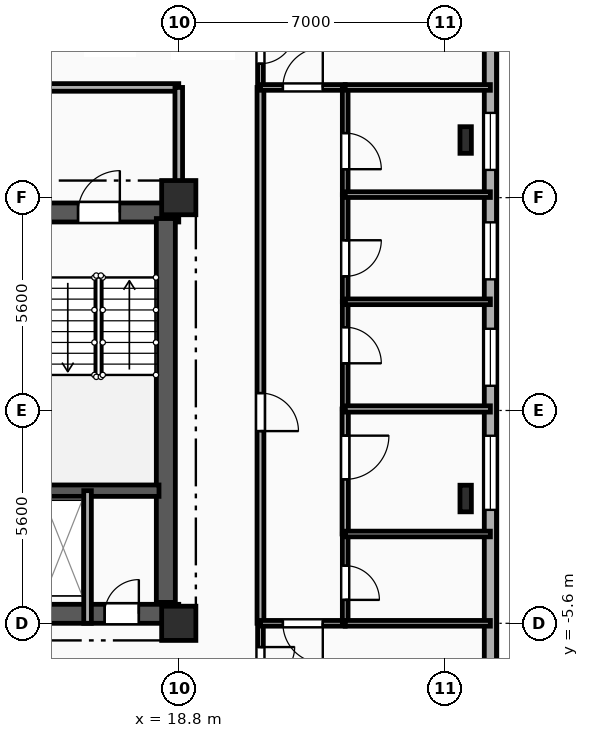
"""IFC4 building model, lengths in metres.
Left out: names, types, materials, properties, quantities, classifications, styles, units other than length and angle.
Written with IfcOpenShell. Run it as: python <this file> out.ifc"""

import sys

from ifc_helpers import new_model, si_unit, direction, frame, frame_2d, origin, origin_2d, place, context, subcontext, project, spatial, rectangle, i_section, extrude, element, fill, save


model = new_model("IFC4")
c1 = context("Model", 3, precision=1e-05, world=origin(), true_north=direction((0.0, 1.0)))
c2 = subcontext(c1, "Body", "Model", "MODEL_VIEW")
j1 = project(units=[si_unit("LENGTHUNIT", "METRE"), si_unit("PLANEANGLEUNIT", "RADIAN")], contexts=[c1])
p1 = place(None, origin())
s1 = spatial("IfcSite", under=j1, at=p1, CompositionType="ELEMENT")
p2 = place(p1, origin())
s2 = spatial("IfcBuilding", under=s1, at=p2, CompositionType="ELEMENT")
p3 = place(p2, frame((0.0, 0.0, 137.7)))
s3 = spatial("IfcBuildingStorey", under=s2, at=p3, CompositionType="ELEMENT", Elevation=137.7)
for number, where, z_axis, x_axis in (
    (1, (18.8, -5.6, 0.0), (0.0, 0.0, 1.0), (1.0, 0.0, 0.0)),
    (2, (18.8, 5.6, 0.0), (0.0, 0.0, 1.0), (1.0, 0.0, 0.0)),
):
    element("IfcColumn", number, at=place(p3, frame(where, z_axis=z_axis, x_axis=x_axis)), inside=s3, PredefinedType="COLUMN", context=c2, shape_type="SweptSolid", body=[
        extrude(rectangle(XDim=0.9, YDim=0.9, at=origin_2d()), origin(), (0.0, 0.0, 1.0), 3.35),
    ])
for number, where, z_axis, x_axis in (
    (3, (26.35, -2.317, 0.0), (0.0, 0.0, 1.0), (1.0, 0.0, 0.0)),
    (4, (26.35, 7.117, 0.0), (0.0, 0.0, 1.0), (1.0, 0.0, 0.0)),
):
    element("IfcColumn", number, at=place(p3, frame(where, z_axis=z_axis, x_axis=x_axis)), inside=s3, PredefinedType="COLUMN", context=c2, shape_type="SweptSolid", body=[
        extrude(i_section(OverallWidth=0.3, OverallDepth=0.7, WebThickness=0.017, FlangeThickness=0.032, FilletRadius=0.027, at=origin_2d()), origin(), (0.0, 0.0, 1.0), 3.35),
    ])
p4 = place(p3, frame((27.0, 17.2, 0.0), z_axis=(0.0, 0.0, 1.0), x_axis=(0.0, -1.0, 0.0)))
e5 = element("IfcWall", 5, at=p4, inside=s3, PredefinedType="SOLIDWALL", context=c2, shape_type="SweptSolid", body=[
    extrude(rectangle(XDim=29.6, YDim=0.32, at=frame_2d((14.8, 0.0))), origin(), (0.0, 0.0, 1.0), 3.04),
])
p5 = place(p4, frame((3.775, 0.0, 0.85)))
e6 = element("IfcOpeningElement", 6, at=p5, cuts=e5, PredefinedType="OPENING", context=c2, shape_type="SweptSolid", body=[
    extrude(rectangle(XDim=1.65, YDim=1.85, at=frame_2d((0.825, 0.925))), frame((0.0, 0.17, 0.0), z_axis=(0.0, -1.0, 0.0), x_axis=(1.0, 0.0, 0.0)), (0.0, 0.0, 1.0), 0.34),
])
p6 = place(p4, frame((9.37, 0.0, 0.85)))
e7 = element("IfcOpeningElement", 7, at=p6, cuts=e5, PredefinedType="OPENING", context=c2, shape_type="SweptSolid", body=[
    extrude(rectangle(XDim=1.5, YDim=1.85, at=frame_2d((0.75, 0.925))), frame((0.0, 0.17, 0.0), z_axis=(0.0, -1.0, 0.0), x_axis=(1.0, 0.0, 0.0)), (0.0, 0.0, 1.0), 0.34),
])
p7 = place(p4, frame((12.25, 0.0, 0.85)))
e8 = element("IfcOpeningElement", 8, at=p7, cuts=e5, PredefinedType="OPENING", context=c2, shape_type="SweptSolid", body=[
    extrude(rectangle(XDim=1.5, YDim=1.85, at=frame_2d((0.75, 0.925))), frame((0.0, 0.17, 0.0), z_axis=(0.0, -1.0, 0.0), x_axis=(1.0, 0.0, 0.0)), (0.0, 0.0, 1.0), 0.34),
])
p8 = place(p4, frame((15.05, 0.0, 0.85)))
e9 = element("IfcOpeningElement", 9, at=p8, cuts=e5, PredefinedType="OPENING", context=c2, shape_type="SweptSolid", body=[
    extrude(rectangle(XDim=1.5, YDim=1.85, at=frame_2d((0.75, 0.925))), frame((0.0, 0.17, 0.0), z_axis=(0.0, -1.0, 0.0), x_axis=(1.0, 0.0, 0.0)), (0.0, 0.0, 1.0), 0.34),
])
p9 = place(p4, frame((17.865, 0.0, 0.85)))
e10 = element("IfcOpeningElement", 10, at=p9, cuts=e5, PredefinedType="OPENING", context=c2, shape_type="SweptSolid", body=[
    extrude(rectangle(XDim=1.95, YDim=1.85, at=frame_2d((0.975, 0.925))), frame((0.0, 0.17, 0.0), z_axis=(0.0, -1.0, 0.0), x_axis=(1.0, 0.0, 0.0)), (0.0, 0.0, 1.0), 0.34),
])
p10 = place(p4, frame((25.175, 0.0, 0.85)))
e11 = element("IfcOpeningElement", 11, at=p10, cuts=e5, PredefinedType="OPENING", context=c2, shape_type="SweptSolid", body=[
    extrude(rectangle(XDim=1.65, YDim=1.85, at=frame_2d((0.825, 0.925))), frame((0.0, 0.17, 0.0), z_axis=(0.0, -1.0, 0.0), x_axis=(1.0, 0.0, 0.0)), (0.0, 0.0, 1.0), 0.34),
])
p11 = place(p3, frame((9.2, 5.21, 0.0), z_axis=(0.0, 0.0, 1.0), x_axis=(1.0, 0.0, 0.0)))
e12 = element("IfcWall", 12, at=p11, inside=s3, PredefinedType="SHEAR", context=c2, shape_type="SweptSolid", body=[
    extrude(rectangle(XDim=9.6, YDim=0.5, at=frame_2d((4.8, 0.0))), origin(), (0.0, 0.0, 1.0), 3.04),
])
p12 = place(p11, frame((6.95, 0.0, 0.0)))
e13 = element("IfcOpeningElement", 13, at=p12, cuts=e12, PredefinedType="OPENING", context=c2, shape_type="SweptSolid", body=[
    extrude(rectangle(XDim=1.1, YDim=2.15, at=frame_2d((0.55, 1.075))), frame((0.0, 0.26, 0.0), z_axis=(0.0, -1.0, 0.0), x_axis=(1.0, 0.0, 0.0)), (0.0, 0.0, 1.0), 0.52),
])
p13 = place(p11, frame((3.775, 0.0, 0.0)))
e14 = element("IfcOpeningElement", 14, at=p13, cuts=e12, PredefinedType="OPENING", context=c2, shape_type="SweptSolid", body=[
    extrude(rectangle(XDim=1.05, YDim=2.1, at=frame_2d((0.525, 1.05))), frame((0.0, 0.26, 0.0), z_axis=(0.0, -1.0, 0.0), x_axis=(1.0, 0.0, 0.0)), (0.0, 0.0, 1.0), 0.52),
])
p14 = place(p3, frame((9.2, -5.35, 0.0), z_axis=(0.0, 0.0, 1.0), x_axis=(1.0, 0.0, 0.0)))
e15 = element("IfcWall", 15, at=p14, inside=s3, PredefinedType="SHEAR", context=c2, shape_type="SweptSolid", body=[
    extrude(rectangle(XDim=9.6, YDim=0.5, at=frame_2d((4.8, 0.0))), origin(), (0.0, 0.0, 1.0), 3.04),
])
p15 = place(p14, frame((7.65, 0.0, 0.0)))
e16 = element("IfcOpeningElement", 16, at=p15, cuts=e15, PredefinedType="OPENING", context=c2, shape_type="SweptSolid", body=[
    extrude(rectangle(XDim=0.9, YDim=2.1, at=frame_2d((0.45, 1.05))), frame((0.0, 0.26, 0.0), z_axis=(0.0, -1.0, 0.0), x_axis=(1.0, 0.0, 0.0)), (0.0, 0.0, 1.0), 0.52),
])
p16 = place(p3, frame((18.46, -5.05, 0.0), z_axis=(0.0, 0.0, 1.0), x_axis=(0.0, 1.0, 0.0)))
e17 = element("IfcWall", 17, at=p16, inside=s3, PredefinedType="SHEAR", context=c2, shape_type="SweptSolid", body=[
    extrude(rectangle(XDim=10.1, YDim=0.5, at=frame_2d((5.05, 0.0))), origin(), (0.0, 0.0, 1.0), 3.04),
])
p17 = place(p3, frame((15.1, -2.11, 0.0), z_axis=(0.0, 0.0, 1.0), x_axis=(1.0, 0.0, 0.0)))
e18 = element("IfcWall", 18, at=p17, inside=s3, PredefinedType="SHEAR", context=c2, shape_type="SweptSolid", body=[
    extrude(rectangle(XDim=3.18, YDim=0.3, at=frame_2d((1.59, 0.0))), origin(), (0.0, 0.0, 1.0), 3.04),
])
p18 = place(p3, frame((16.4, -2.11, 0.0), z_axis=(0.0, 0.0, 1.0), x_axis=(0.0, -1.0, 0.0)))
e19 = element("IfcWall", 19, at=p18, inside=s3, PredefinedType="PARTITIONING", context=c2, shape_type="SweptSolid", body=[
    extrude(rectangle(XDim=3.49, YDim=0.2, at=frame_2d((1.745, 0.0))), origin(), (0.0, 0.0, 1.0), 3.04),
])
p19 = place(p3, frame((18.8, 8.5, 0.0), z_axis=(0.0, 0.0, 1.0), x_axis=(-1.0, 0.0, 0.0)))
e20 = element("IfcWall", 20, at=p19, inside=s3, PredefinedType="PARTITIONING", context=c2, shape_type="SweptSolid", body=[
    extrude(rectangle(XDim=6.8, YDim=0.2, at=frame_2d((3.4, 0.0))), origin(), (0.0, 0.0, 1.0), 3.04),
])
p20 = place(p19, frame((3.985, 0.0, 0.0)))
e21 = element("IfcOpeningElement", 21, at=p20, cuts=e20, PredefinedType="OPENING", context=c2, shape_type="SweptSolid", body=[
    extrude(rectangle(XDim=1.1, YDim=2.15, at=frame_2d((0.55, 1.075))), frame((0.0, 0.11, 0.0), z_axis=(0.0, -1.0, 0.0), x_axis=(1.0, 0.0, 0.0)), (0.0, 0.0, 1.0), 0.22),
])
p21 = place(p3, frame((18.8, 5.6, 0.0), z_axis=(0.0, 0.0, 1.0), x_axis=(0.0, 1.0, 0.0)))
e22 = element("IfcWall", 22, at=p21, inside=s3, PredefinedType="PARTITIONING", context=c2, shape_type="SweptSolid", body=[
    extrude(rectangle(XDim=2.9, YDim=0.2, at=frame_2d((1.45, 0.0))), origin(), (0.0, 0.0, 1.0), 2.525),
])
p22 = place(p3, frame((20.95, 10.65, 0.0), z_axis=(0.0, 0.0, 1.0), x_axis=(0.0, -1.0, 0.0)))
e23 = element("IfcWall", 23, at=p22, inside=s3, PredefinedType="PARTITIONING", context=c2, shape_type="SweptSolid", body=[
    extrude(rectangle(XDim=2.15, YDim=0.15, at=frame_2d((1.075, 0.0))), origin(), (0.0, 0.0, 1.0), 3.04),
])
p23 = place(p22, frame((0.625, 0.0, 0.0)))
e24 = element("IfcOpeningElement", 24, at=p23, cuts=e23, PredefinedType="OPENING", context=c2, shape_type="SweptSolid", body=[
    extrude(rectangle(XDim=0.9, YDim=2.1, at=frame_2d((0.45, 1.05))), frame((0.0, 0.085, 0.0), z_axis=(0.0, -1.0, 0.0), x_axis=(1.0, 0.0, 0.0)), (0.0, 0.0, 1.0), 0.17),
])
p24 = place(p3, frame((20.95, -5.6, 0.0), z_axis=(0.0, 0.0, 1.0), x_axis=(0.0, -1.0, 0.0)))
e25 = element("IfcWall", 25, at=p24, inside=s3, PredefinedType="PARTITIONING", context=c2, shape_type="SweptSolid", body=[
    extrude(rectangle(XDim=2.15, YDim=0.15, at=frame_2d((1.075, 0.0))), origin(), (0.0, 0.0, 1.0), 3.04),
])
p25 = place(p24, frame((0.625, 0.0, 0.0)))
e26 = element("IfcOpeningElement", 26, at=p25, cuts=e25, PredefinedType="OPENING", context=c2, shape_type="SweptSolid", body=[
    extrude(rectangle(XDim=0.9, YDim=2.1, at=frame_2d((0.45, 1.05))), frame((0.0, 0.085, 0.0), z_axis=(0.0, -1.0, 0.0), x_axis=(1.0, 0.0, 0.0)), (0.0, 0.0, 1.0), 0.17),
])
p26 = place(p3, frame((20.95, 8.5, 0.0), z_axis=(0.0, 0.0, 1.0), x_axis=(0.0, -1.0, 0.0)))
e27 = element("IfcWall", 27, at=p26, inside=s3, PredefinedType="PARTITIONING", context=c2, shape_type="SweptSolid", body=[
    extrude(rectangle(XDim=14.1, YDim=0.18, at=frame_2d((7.05, 0.0))), origin(), (0.0, 0.0, 1.0), 3.04),
])
p27 = place(p26, frame((8.042, 0.0, 0.0)))
e28 = element("IfcOpeningElement", 28, at=p27, cuts=e27, PredefinedType="OPENING", context=c2, shape_type="SweptSolid", body=[
    extrude(rectangle(XDim=1.0, YDim=2.15, at=frame_2d((0.5, 1.075))), frame((0.0, 0.1, 0.0), z_axis=(0.0, -1.0, 0.0), x_axis=(1.0, 0.0, 0.0)), (0.0, 0.0, 1.0), 0.2),
])
p28 = place(p3, frame((20.95, 8.5, 0.0), z_axis=(0.0, 0.0, 1.0), x_axis=(1.0, 0.0, 0.0)))
e29 = element("IfcWall", 29, at=p28, inside=s3, PredefinedType="PARTITIONING", context=c2, shape_type="SweptSolid", body=[
    extrude(rectangle(XDim=2.23, YDim=0.15, at=frame_2d((1.115, 0.0))), origin(), (0.0, 0.0, 1.0), 3.04),
])
p29 = place(p28, frame((0.59, 0.0, 0.0)))
e30 = element("IfcOpeningElement", 30, at=p29, cuts=e29, PredefinedType="OPENING", context=c2, shape_type="SweptSolid", body=[
    extrude(rectangle(XDim=1.05, YDim=2.15, at=frame_2d((0.525, 1.075))), frame((0.0, 0.085, 0.0), z_axis=(0.0, -1.0, 0.0), x_axis=(1.0, 0.0, 0.0)), (0.0, 0.0, 1.0), 0.17),
])
p30 = place(p3, frame((23.18, -5.6, 0.0), z_axis=(0.0, 0.0, 1.0), x_axis=(-1.0, 0.0, 0.0)))
e31 = element("IfcWall", 31, at=p30, inside=s3, PredefinedType="PARTITIONING", context=c2, shape_type="SweptSolid", body=[
    extrude(rectangle(XDim=2.23, YDim=0.15, at=frame_2d((1.115, 0.0))), origin(), (0.0, 0.0, 1.0), 3.04),
])
p31 = place(p30, frame((0.59, 0.0, 0.0)))
e32 = element("IfcOpeningElement", 32, at=p31, cuts=e31, PredefinedType="OPENING", context=c2, shape_type="SweptSolid", body=[
    extrude(rectangle(XDim=1.05, YDim=2.15, at=frame_2d((0.525, 1.075))), frame((0.0, 0.085, 0.0), z_axis=(0.0, -1.0, 0.0), x_axis=(1.0, 0.0, 0.0)), (0.0, 0.0, 1.0), 0.17),
])
p32 = place(p3, frame((23.18, -3.25, 0.0), z_axis=(0.0, 0.0, 1.0), x_axis=(0.0, -1.0, 0.0)))
e33 = element("IfcWall", 33, at=p32, inside=s3, PredefinedType="PLUMBINGWALL", context=c2, shape_type="SweptSolid", body=[
    extrude(rectangle(XDim=2.35, YDim=0.15, at=frame_2d((1.175, 0.0))), origin(), (0.0, 0.0, 1.0), 3.04),
])
p33 = place(p32, frame((0.834, 0.0, 0.0)))
e34 = element("IfcOpeningElement", 34, at=p33, cuts=e33, PredefinedType="OPENING", context=c2, shape_type="SweptSolid", body=[
    extrude(rectangle(XDim=0.9, YDim=2.1, at=frame_2d((0.45, 1.05))), frame((0.0, 0.085, 0.0), z_axis=(0.0, -1.0, 0.0), x_axis=(1.0, 0.0, 0.0)), (0.0, 0.0, 1.0), 0.17),
])
p34 = place(p3, frame((23.18, 0.04, 0.0), z_axis=(0.0, 0.0, 1.0), x_axis=(0.0, -1.0, 0.0)))
e35 = element("IfcWall", 35, at=p34, inside=s3, PredefinedType="PARTITIONING", context=c2, shape_type="SweptSolid", body=[
    extrude(rectangle(XDim=3.29, YDim=0.165, at=frame_2d((1.645, 0.0))), origin(), (0.0, 0.0, 1.0), 3.04),
])
p35 = place(p34, frame((0.702, 0.0, 0.0)))
e36 = element("IfcOpeningElement", 36, at=p35, cuts=e35, PredefinedType="OPENING", context=c2, shape_type="SweptSolid", body=[
    extrude(rectangle(XDim=1.15, YDim=2.15, at=frame_2d((0.575, 1.075))), frame((0.0, 0.093, 0.0), z_axis=(0.0, -1.0, 0.0), x_axis=(1.0, 0.0, 0.0)), (0.0, 0.0, 1.0), 0.185),
])
p36 = place(p3, frame((23.18, 2.86, 0.0), z_axis=(0.0, 0.0, 1.0), x_axis=(0.0, -1.0, 0.0)))
e37 = element("IfcWall", 37, at=p36, inside=s3, PredefinedType="PARTITIONING", context=c2, shape_type="SweptSolid", body=[
    extrude(rectangle(XDim=2.82, YDim=0.15, at=frame_2d((1.41, 0.0))), origin(), (0.0, 0.0, 1.0), 3.04),
])
p37 = place(p36, frame((0.669, 0.0, 0.0)))
e38 = element("IfcOpeningElement", 38, at=p37, cuts=e37, PredefinedType="OPENING", context=c2, shape_type="SweptSolid", body=[
    extrude(rectangle(XDim=0.95, YDim=2.1, at=frame_2d((0.475, 1.05))), frame((0.0, 0.085, 0.0), z_axis=(0.0, -1.0, 0.0), x_axis=(1.0, 0.0, 0.0)), (0.0, 0.0, 1.0), 0.17),
])
p38 = place(p3, frame((23.18, 5.68, 0.0), z_axis=(0.0, 0.0, 1.0), x_axis=(0.0, -1.0, 0.0)))
e39 = element("IfcWall", 39, at=p38, inside=s3, PredefinedType="PARTITIONING", context=c2, shape_type="SweptSolid", body=[
    extrude(rectangle(XDim=2.82, YDim=0.15, at=frame_2d((1.41, 0.0))), origin(), (0.0, 0.0, 1.0), 3.04),
])
p39 = place(p38, frame((1.201, 0.0, 0.0)))
e40 = element("IfcOpeningElement", 40, at=p39, cuts=e39, PredefinedType="OPENING", context=c2, shape_type="SweptSolid", body=[
    extrude(rectangle(XDim=0.95, YDim=2.1, at=frame_2d((0.475, 1.05))), frame((0.0, 0.085, 0.0), z_axis=(0.0, -1.0, 0.0), x_axis=(1.0, 0.0, 0.0)), (0.0, 0.0, 1.0), 0.17),
])
p40 = place(p3, frame((23.18, 8.5, 0.0), z_axis=(0.0, 0.0, 1.0), x_axis=(0.0, -1.0, 0.0)))
e41 = element("IfcWall", 41, at=p40, inside=s3, PredefinedType="PARTITIONING", context=c2, shape_type="SweptSolid", body=[
    extrude(rectangle(XDim=2.82, YDim=0.15, at=frame_2d((1.41, 0.0))), origin(), (0.0, 0.0, 1.0), 3.04),
])
p41 = place(p40, frame((1.201, 0.0, 0.0)))
e42 = element("IfcOpeningElement", 42, at=p41, cuts=e41, PredefinedType="OPENING", context=c2, shape_type="SweptSolid", body=[
    extrude(rectangle(XDim=0.95, YDim=2.1, at=frame_2d((0.475, 1.05))), frame((0.0, 0.085, 0.0), z_axis=(0.0, -1.0, 0.0), x_axis=(1.0, 0.0, 0.0)), (0.0, 0.0, 1.0), 0.17),
])
p42 = place(p3, frame((27.0, 8.5, 0.0), z_axis=(0.0, 0.0, 1.0), x_axis=(-1.0, 0.0, 0.0)))
e43 = element("IfcWall", 43, at=p42, inside=s3, PredefinedType="PARTITIONING", context=c2, shape_type="SweptSolid", body=[
    extrude(rectangle(XDim=3.82, YDim=0.15, at=frame_2d((1.91, 0.0))), origin(), (0.0, 0.0, 1.0), 3.04),
])
for number, where, z_axis, x_axis in (
    (44, (23.18, -5.6, 0.0), (0.0, 0.0, 1.0), (1.0, 0.0, 0.0)),
    (45, (23.18, -3.25, 0.0), (0.0, 0.0, 1.0), (1.0, 0.0, 0.0)),
):
    element("IfcWall", number, at=place(p3, frame(where, z_axis=z_axis, x_axis=x_axis)), inside=s3, PredefinedType="PLUMBINGWALL", context=c2, shape_type="SweptSolid", body=[
        extrude(rectangle(XDim=3.82, YDim=0.15, at=frame_2d((1.91, 0.0))), origin(), (0.0, 0.0, 1.0), 3.04),
    ])
p43 = place(p3, frame((23.18, 0.04, 0.0), z_axis=(0.0, 0.0, 1.0), x_axis=(1.0, 0.0, 0.0)))
e46 = element("IfcWall", 46, at=p43, inside=s3, PredefinedType="PARTITIONING", context=c2, shape_type="SweptSolid", body=[
    extrude(rectangle(XDim=3.82, YDim=0.165, at=frame_2d((1.91, 0.0))), origin(), (0.0, 0.0, 1.0), 3.04),
])
for number, where, z_axis, x_axis in (
    (47, (23.18, 2.86, 0.0), (0.0, 0.0, 1.0), (1.0, 0.0, 0.0)),
    (48, (23.18, 5.68, 0.0), (0.0, 0.0, 1.0), (1.0, 0.0, 0.0)),
):
    element("IfcWall", number, at=place(p3, frame(where, z_axis=z_axis, x_axis=x_axis)), inside=s3, PredefinedType="PARTITIONING", context=c2, shape_type="SweptSolid", body=[
        extrude(rectangle(XDim=3.82, YDim=0.15, at=frame_2d((1.91, 0.0))), origin(), (0.0, 0.0, 1.0), 3.04),
    ])
p44 = place(p6, origin())
e49 = element("IfcWindow", 49, at=p44, inside=s3, PartitioningType="SINGLE_PANEL", PredefinedType="WINDOW", context=c2, shape_type="SweptSolid", body=[
    extrude(rectangle(XDim=1.5, YDim=1.85, at=frame_2d((0.75, 0.925))), frame((0.0, 0.03, 0.0), z_axis=(0.0, -1.0, 0.0), x_axis=(1.0, 0.0, 0.0)), (0.0, 0.0, 1.0), 0.06),
])
fill(e7, e49)
p45 = place(p7, origin())
e50 = element("IfcWindow", 50, at=p45, inside=s3, PartitioningType="SINGLE_PANEL", PredefinedType="WINDOW", context=c2, shape_type="SweptSolid", body=[
    extrude(rectangle(XDim=1.5, YDim=1.85, at=frame_2d((0.75, 0.925))), frame((0.0, 0.03, 0.0), z_axis=(0.0, -1.0, 0.0), x_axis=(1.0, 0.0, 0.0)), (0.0, 0.0, 1.0), 0.06),
])
fill(e8, e50)
p46 = place(p8, origin())
e51 = element("IfcWindow", 51, at=p46, inside=s3, PartitioningType="SINGLE_PANEL", PredefinedType="WINDOW", context=c2, shape_type="SweptSolid", body=[
    extrude(rectangle(XDim=1.5, YDim=1.85, at=frame_2d((0.75, 0.925))), frame((0.0, 0.03, 0.0), z_axis=(0.0, -1.0, 0.0), x_axis=(1.0, 0.0, 0.0)), (0.0, 0.0, 1.0), 0.06),
])
fill(e9, e51)
p47 = place(p9, origin())
e52 = element("IfcWindow", 52, at=p47, inside=s3, PartitioningType="SINGLE_PANEL", PredefinedType="WINDOW", context=c2, shape_type="SweptSolid", body=[
    extrude(rectangle(XDim=1.95, YDim=1.85, at=frame_2d((0.975, 0.925))), frame((0.0, 0.03, 0.0), z_axis=(0.0, -1.0, 0.0), x_axis=(1.0, 0.0, 0.0)), (0.0, 0.0, 1.0), 0.06),
])
fill(e10, e52)
p48 = place(p12, origin())
e53 = element("IfcDoor", 53, at=p48, inside=s3, OperationType="SINGLE_SWING_RIGHT", PredefinedType="DOOR", context=c2, shape_type="SweptSolid", body=[
    extrude(rectangle(XDim=1.1, YDim=2.15, at=frame_2d((0.55, 1.075))), frame((0.0, 0.025, 0.0), z_axis=(0.0, -1.0, 0.0), x_axis=(1.0, 0.0, 0.0)), (0.0, 0.0, 1.0), 0.05),
])
fill(e13, e53)
p49 = place(p15, origin())
e54 = element("IfcDoor", 54, at=p49, inside=s3, OperationType="SINGLE_SWING_RIGHT", PredefinedType="DOOR", context=c2, shape_type="SweptSolid", body=[
    extrude(rectangle(XDim=0.9, YDim=2.1, at=frame_2d((0.45, 1.05))), frame((0.0, 0.025, 0.0), z_axis=(0.0, -1.0, 0.0), x_axis=(1.0, 0.0, 0.0)), (0.0, 0.0, 1.0), 0.05),
])
fill(e16, e54)
p50 = place(p23, origin())
e55 = element("IfcDoor", 55, at=p50, inside=s3, OperationType="SINGLE_SWING_LEFT", PredefinedType="DOOR", context=c2, shape_type="SweptSolid", body=[
    extrude(rectangle(XDim=0.9, YDim=2.1, at=frame_2d((0.45, 1.05))), frame((0.0, 0.025, 0.0), z_axis=(0.0, -1.0, 0.0), x_axis=(1.0, 0.0, 0.0)), (0.0, 0.0, 1.0), 0.05),
])
fill(e24, e55)
p51 = place(p25, origin())
e56 = element("IfcDoor", 56, at=p51, inside=s3, OperationType="SINGLE_SWING_LEFT", PredefinedType="DOOR", context=c2, shape_type="SweptSolid", body=[
    extrude(rectangle(XDim=0.9, YDim=2.1, at=frame_2d((0.45, 1.05))), frame((0.0, 0.025, 0.0), z_axis=(0.0, -1.0, 0.0), x_axis=(1.0, 0.0, 0.0)), (0.0, 0.0, 1.0), 0.05),
])
fill(e26, e56)
p52 = place(p27, origin())
e57 = element("IfcDoor", 57, at=p52, inside=s3, OperationType="SINGLE_SWING_RIGHT", PredefinedType="DOOR", context=c2, shape_type="SweptSolid", body=[
    extrude(rectangle(XDim=1.0, YDim=2.15, at=frame_2d((0.5, 1.075))), frame((0.0, 0.025, 0.0), z_axis=(0.0, -1.0, 0.0), x_axis=(1.0, 0.0, 0.0)), (0.0, 0.0, 1.0), 0.05),
])
fill(e28, e57)
p53 = place(p29, origin())
e58 = element("IfcDoor", 58, at=p53, inside=s3, OperationType="SINGLE_SWING_RIGHT", PredefinedType="DOOR", context=c2, shape_type="SweptSolid", body=[
    extrude(rectangle(XDim=1.05, YDim=2.15, at=frame_2d((0.525, 1.075))), frame((0.0, 0.025, 0.0), z_axis=(0.0, -1.0, 0.0), x_axis=(1.0, 0.0, 0.0)), (0.0, 0.0, 1.0), 0.05),
])
fill(e30, e58)
p54 = place(p31, origin())
e59 = element("IfcDoor", 59, at=p54, inside=s3, OperationType="SINGLE_SWING_LEFT", PredefinedType="DOOR", context=c2, shape_type="SweptSolid", body=[
    extrude(rectangle(XDim=1.05, YDim=2.15, at=frame_2d((0.525, 1.075))), frame((0.0, 0.025, 0.0), z_axis=(0.0, -1.0, 0.0), x_axis=(1.0, 0.0, 0.0)), (0.0, 0.0, 1.0), 0.05),
])
fill(e32, e59)
p55 = place(p33, origin())
e60 = element("IfcDoor", 60, at=p55, inside=s3, OperationType="SINGLE_SWING_RIGHT", PredefinedType="DOOR", context=c2, shape_type="SweptSolid", body=[
    extrude(rectangle(XDim=0.9, YDim=2.1, at=frame_2d((0.45, 1.05))), frame((0.0, 0.025, 0.0), z_axis=(0.0, -1.0, 0.0), x_axis=(1.0, 0.0, 0.0)), (0.0, 0.0, 1.0), 0.05),
])
fill(e34, e60)
p56 = place(p35, origin())
e61 = element("IfcDoor", 61, at=p56, inside=s3, OperationType="SINGLE_SWING_LEFT", PredefinedType="DOOR", context=c2, shape_type="SweptSolid", body=[
    extrude(rectangle(XDim=1.15, YDim=2.15, at=frame_2d((0.575, 1.075))), frame((0.0, 0.025, 0.0), z_axis=(0.0, -1.0, 0.0), x_axis=(1.0, 0.0, 0.0)), (0.0, 0.0, 1.0), 0.05),
])
fill(e36, e61)
p57 = place(p37, origin())
e62 = element("IfcDoor", 62, at=p57, inside=s3, OperationType="SINGLE_SWING_RIGHT", PredefinedType="DOOR", context=c2, shape_type="SweptSolid", body=[
    extrude(rectangle(XDim=0.95, YDim=2.1, at=frame_2d((0.475, 1.05))), frame((0.0, 0.025, 0.0), z_axis=(0.0, -1.0, 0.0), x_axis=(1.0, 0.0, 0.0)), (0.0, 0.0, 1.0), 0.05),
])
fill(e38, e62)
p58 = place(p39, origin())
e63 = element("IfcDoor", 63, at=p58, inside=s3, OperationType="SINGLE_SWING_LEFT", PredefinedType="DOOR", context=c2, shape_type="SweptSolid", body=[
    extrude(rectangle(XDim=0.95, YDim=2.1, at=frame_2d((0.475, 1.05))), frame((0.0, 0.025, 0.0), z_axis=(0.0, -1.0, 0.0), x_axis=(1.0, 0.0, 0.0)), (0.0, 0.0, 1.0), 0.05),
])
fill(e40, e63)
p59 = place(p41, origin())
e64 = element("IfcDoor", 64, at=p59, inside=s3, OperationType="SINGLE_SWING_RIGHT", PredefinedType="DOOR", context=c2, shape_type="SweptSolid", body=[
    extrude(rectangle(XDim=0.95, YDim=2.1, at=frame_2d((0.475, 1.05))), frame((0.0, 0.025, 0.0), z_axis=(0.0, -1.0, 0.0), x_axis=(1.0, 0.0, 0.0)), (0.0, 0.0, 1.0), 0.05),
])
fill(e42, e64)
save(model, sys.argv[1])
